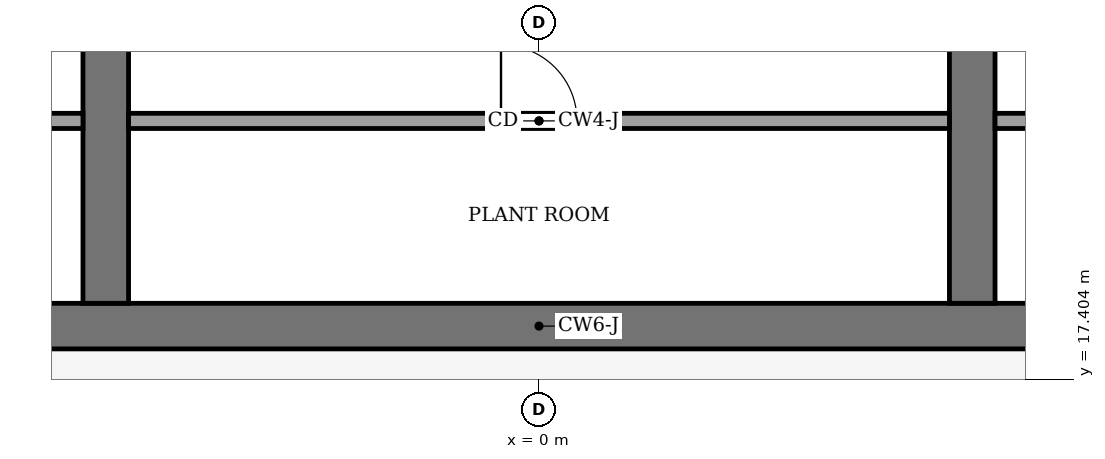
"""IFC4 building model, lengths in metres.
Left out: names, types, materials, properties, quantities, classifications, styles, units other than length and angle.
Written with IfcOpenShell. Run it as: python <this file> out.ifc"""

import sys

from ifc_helpers import new_model, si_unit, direction, frame, frame_2d, origin, place, context, subcontext, project, spatial, rectangle, extrude, element, fill, save


model = new_model("IFC4")
c1 = context("Model", 3, precision=1e-05, world=origin(), true_north=direction((0.0, 1.0)))
c2 = subcontext(c1, "Body", "Model", "MODEL_VIEW")
j1 = project(units=[si_unit("LENGTHUNIT", "METRE"), si_unit("PLANEANGLEUNIT", "RADIAN")], contexts=[c1])
p1 = place(None, origin())
s1 = spatial("IfcSite", under=j1, at=p1, CompositionType="ELEMENT")
p2 = place(p1, origin())
s2 = spatial("IfcBuilding", under=s1, at=p2, CompositionType="ELEMENT")
p3 = place(p2, frame((0.0, 0.0, 359.5)))
s3 = spatial("IfcBuildingStorey", under=s2, at=p3, CompositionType="ELEMENT", Elevation=359.5)
p4 = place(p3, frame((-13.2, 18.1, -0.15), z_axis=(0.0, 0.0, 1.0), x_axis=(1.0, 0.0, 0.0)))
e1 = element("IfcWall", 1, at=p4, inside=s3, PredefinedType="SHEAR", context=c2, shape_type="SweptSolid", body=[
    extrude(rectangle(XDim=26.4, YDim=0.6, at=frame_2d((13.2, 0.0))), origin(), (0.0, 0.0, 1.0), 4.5),
])
p5 = place(p3, frame((-5.7, 18.4, -0.15), z_axis=(0.0, 0.0, 1.0), x_axis=(0.0, 1.0, 0.0)))
e2 = element("IfcWall", 2, at=p5, inside=s3, PredefinedType="SHEAR", context=c2, shape_type="SweptSolid", body=[
    extrude(rectangle(XDim=19.2, YDim=0.6, at=frame_2d((9.6, 0.0))), origin(), (0.0, 0.0, 1.0), 4.5),
])
p6 = place(p5, frame((8.35, 0.0, 0.15)))
e3 = element("IfcOpeningElement", 3, at=p6, cuts=e2, PredefinedType="OPENING", context=c2, shape_type="SweptSolid", body=[
    extrude(rectangle(XDim=0.9, YDim=2.1, at=frame_2d((0.45, 1.05))), frame((0.0, 0.31, 0.0), z_axis=(0.0, -1.0, 0.0), x_axis=(1.0, 0.0, 0.0)), (0.0, 0.0, 1.0), 0.62),
])
p7 = place(p3, frame((5.7, 18.4, -0.15), z_axis=(0.0, 0.0, 1.0), x_axis=(0.0, 1.0, 0.0)))
e4 = element("IfcWall", 4, at=p7, inside=s3, PredefinedType="SHEAR", context=c2, shape_type="SweptSolid", body=[
    extrude(rectangle(XDim=19.2, YDim=0.6, at=frame_2d((9.6, 0.0))), origin(), (0.0, 0.0, 1.0), 4.5),
])
p8 = place(p7, frame((13.3, 0.0, 0.15)))
e5 = element("IfcOpeningElement", 5, at=p8, cuts=e4, PredefinedType="OPENING", context=c2, shape_type="SweptSolid", body=[
    extrude(rectangle(XDim=2.4, YDim=2.4, at=frame_2d((1.2, 1.2))), frame((0.0, 0.31, 0.0), z_axis=(0.0, -1.0, 0.0), x_axis=(1.0, 0.0, 0.0)), (0.0, 0.0, 1.0), 0.62),
])
p9 = place(p3, frame((-12.6, 20.8, 0.0), z_axis=(0.0, 0.0, 1.0), x_axis=(1.0, 0.0, 0.0)))
e6 = element("IfcWall", 6, at=p9, inside=s3, PredefinedType="PARTITIONING", context=c2, shape_type="SweptSolid", body=[
    extrude(rectangle(XDim=6.6, YDim=0.2, at=frame_2d((3.3, 0.0))), origin(), (0.0, 0.0, 1.0), 4.35),
])
p10 = place(p9, frame((2.8, 0.0, 0.0)))
e7 = element("IfcOpeningElement", 7, at=p10, cuts=e6, PredefinedType="OPENING", context=c2, shape_type="SweptSolid", body=[
    extrude(rectangle(XDim=1.0, YDim=2.1, at=frame_2d((0.5, 1.05))), frame((0.0, 0.11, 0.0), z_axis=(0.0, -1.0, 0.0), x_axis=(1.0, 0.0, 0.0)), (0.0, 0.0, 1.0), 0.22),
])
p11 = place(p3, frame((-5.4, 20.8, 0.0), z_axis=(0.0, 0.0, 1.0), x_axis=(1.0, 0.0, 0.0)))
e8 = element("IfcWall", 8, at=p11, inside=s3, PredefinedType="PARTITIONING", context=c2, shape_type="SweptSolid", body=[
    extrude(rectangle(XDim=10.8, YDim=0.2, at=frame_2d((5.4, 0.0))), origin(), (0.0, 0.0, 1.0), 4.35),
])
p12 = place(p11, frame((4.9, 0.0, 0.0)))
e9 = element("IfcOpeningElement", 9, at=p12, cuts=e8, PredefinedType="OPENING", context=c2, shape_type="SweptSolid", body=[
    extrude(rectangle(XDim=1.0, YDim=2.1, at=frame_2d((0.5, 1.05))), frame((0.0, 0.11, 0.0), z_axis=(0.0, -1.0, 0.0), x_axis=(1.0, 0.0, 0.0)), (0.0, 0.0, 1.0), 0.22),
])
p13 = place(p3, frame((6.0, 20.8, 0.0), z_axis=(0.0, 0.0, 1.0), x_axis=(1.0, 0.0, 0.0)))
e10 = element("IfcWall", 10, at=p13, inside=s3, PredefinedType="PARTITIONING", context=c2, shape_type="SweptSolid", body=[
    extrude(rectangle(XDim=6.6, YDim=0.2, at=frame_2d((3.3, 0.0))), origin(), (0.0, 0.0, 1.0), 4.35),
])
p14 = place(p13, frame((2.8, 0.0, 0.0)))
e11 = element("IfcOpeningElement", 11, at=p14, cuts=e10, PredefinedType="OPENING", context=c2, shape_type="SweptSolid", body=[
    extrude(rectangle(XDim=1.0, YDim=2.1, at=frame_2d((0.5, 1.05))), frame((0.0, 0.11, 0.0), z_axis=(0.0, -1.0, 0.0), x_axis=(1.0, 0.0, 0.0)), (0.0, 0.0, 1.0), 0.22),
])
p15 = place(p12, origin())
e12 = element("IfcDoor", 12, at=p15, inside=s3, OperationType="SINGLE_SWING_LEFT", PredefinedType="DOOR", context=c2, shape_type="SweptSolid", body=[
    extrude(rectangle(XDim=1.0, YDim=2.1, at=frame_2d((0.5, 1.05))), frame((0.0, 0.025, 0.0), z_axis=(0.0, -1.0, 0.0), x_axis=(1.0, 0.0, 0.0)), (0.0, 0.0, 1.0), 0.05),
])
fill(e9, e12)
save(model, sys.argv[1])
